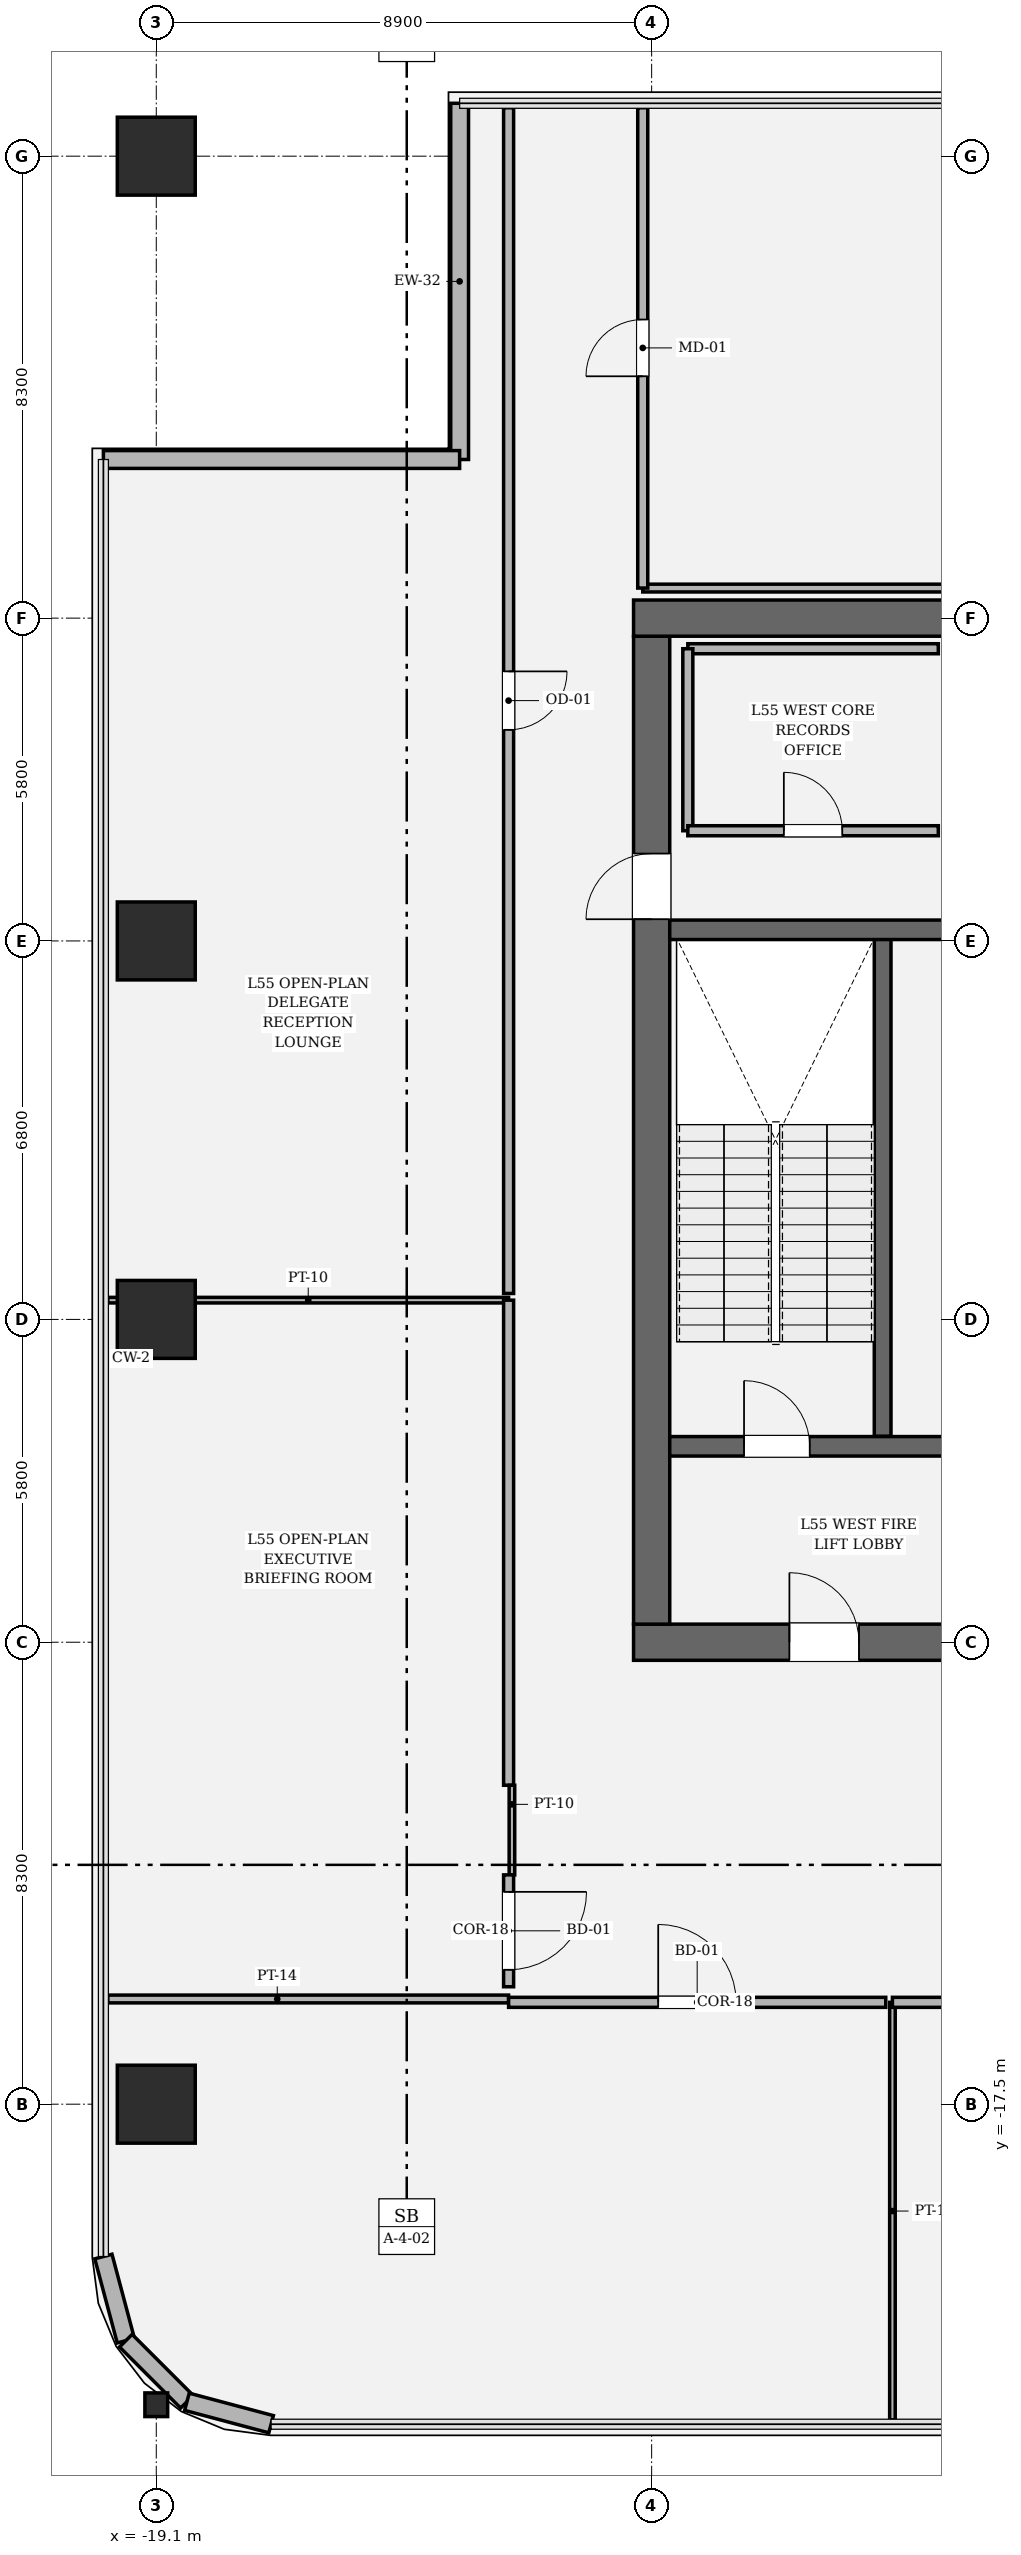
"""IFC4 building model, lengths in metres.
Left out: names, types, materials, properties, quantities, classifications, styles, units other than length and angle.
Written with IfcOpenShell. Run it as: python <this file> out.ifc"""

import sys

from ifc_helpers import new_model, si_unit, direction, frame, frame_2d, origin, origin_2d, place, context, subcontext, project, spatial, rectangle, hollow_rectangle, i_section, extrude, element, fill, save


model = new_model("IFC4")
c1 = context("Model", 3, precision=1e-05, world=origin(), true_north=direction((0.0, 1.0)))
c2 = subcontext(c1, "Body", "Model", "MODEL_VIEW")
j1 = project(units=[si_unit("LENGTHUNIT", "METRE"), si_unit("PLANEANGLEUNIT", "RADIAN")], contexts=[c1])
p1 = place(None, origin())
s1 = spatial("IfcSite", under=j1, at=p1, CompositionType="ELEMENT")
p2 = place(p1, origin())
s2 = spatial("IfcBuilding", under=s1, at=p2, CompositionType="ELEMENT")
p3 = place(p2, frame((0.0, 0.0, 232.95)))
s3 = spatial("IfcBuildingStorey", under=s2, at=p3, CompositionType="ELEMENT", Elevation=232.95)
p4 = place(p3, frame((10.525, -9.2, 0.0), z_axis=(0.0, 0.0, 1.0), x_axis=(-1.0, 0.0, 0.0)))
e1 = element("IfcWall", 1, at=p4, inside=s3, PredefinedType="SHEAR", context=c2, shape_type="SweptSolid", body=[
    extrude(rectangle(XDim=21.05, YDim=0.65, at=frame_2d((10.525, 0.0))), origin(), (0.0, 0.0, 1.0), 4.05),
])
p5 = place(p4, frame((2.8, 0.0, 0.0)))
e2 = element("IfcOpeningElement", 2, at=p5, cuts=e1, PredefinedType="OPENING", context=c2, shape_type="SweptSolid", body=[
    extrude(rectangle(XDim=1.25, YDim=2.25, at=frame_2d((0.625, 1.125))), frame((0.0, 0.335, 0.0), z_axis=(0.0, -1.0, 0.0), x_axis=(1.0, 0.0, 0.0)), (0.0, 0.0, 1.0), 0.67),
])
p6 = place(p4, frame((17.0, 0.0, 0.0)))
e3 = element("IfcOpeningElement", 3, at=p6, cuts=e1, PredefinedType="OPENING", context=c2, shape_type="SweptSolid", body=[
    extrude(rectangle(XDim=1.25, YDim=2.25, at=frame_2d((0.625, 1.125))), frame((0.0, 0.335, 0.0), z_axis=(0.0, -1.0, 0.0), x_axis=(1.0, 0.0, 0.0)), (0.0, 0.0, 1.0), 0.67),
])
p7 = place(p3, frame((-10.2, -8.875, 0.0), z_axis=(0.0, 0.0, 1.0), x_axis=(0.0, 1.0, 0.0)))
e4 = element("IfcWall", 4, at=p7, inside=s3, PredefinedType="SHEAR", context=c2, shape_type="SweptSolid", body=[
    extrude(rectangle(XDim=17.75, YDim=0.65, at=frame_2d((8.875, 0.0))), origin(), (0.0, 0.0, 1.0), 4.05),
])
p8 = place(p7, frame((12.665, 0.0, 0.0)))
e5 = element("IfcOpeningElement", 5, at=p8, cuts=e4, PredefinedType="OPENING", context=c2, shape_type="SweptSolid", body=[
    extrude(rectangle(XDim=1.18, YDim=2.2, at=frame_2d((0.59, 1.1))), frame((0.0, 0.335, 0.0), z_axis=(0.0, -1.0, 0.0), x_axis=(1.0, 0.0, 0.0)), (0.0, 0.0, 1.0), 0.67),
])
p9 = place(p3, frame((-10.525, 9.2, 0.0), z_axis=(0.0, 0.0, 1.0), x_axis=(1.0, 0.0, 0.0)))
e6 = element("IfcWall", 6, at=p9, inside=s3, PredefinedType="SHEAR", context=c2, shape_type="SweptSolid", body=[
    extrude(rectangle(XDim=21.05, YDim=0.65, at=frame_2d((10.525, 0.0))), origin(), (0.0, 0.0, 1.0), 4.05),
])
p10 = place(p3, frame((-6.05, -5.5, 0.0), z_axis=(0.0, 0.0, 1.0), x_axis=(0.0, 1.0, 0.0)))
e7 = element("IfcWall", 7, at=p10, inside=s3, PredefinedType="SOLIDWALL", context=c2, shape_type="SweptSolid", body=[
    extrude(rectangle(XDim=8.95, YDim=0.3, at=frame_2d((4.475, 0.0))), origin(), (0.0, 0.0, 1.0), 4.05),
])
p11 = place(p3, frame((-9.875, -5.68, 0.0), z_axis=(0.0, 0.0, 1.0), x_axis=(1.0, 0.0, 0.0)))
e8 = element("IfcWall", 8, at=p11, inside=s3, PredefinedType="SOLIDWALL", context=c2, shape_type="SweptSolid", body=[
    extrude(rectangle(XDim=5.225, YDim=0.35, at=frame_2d((2.613, 0.0))), origin(), (0.0, 0.0, 1.0), 4.05),
])
p12 = place(p11, frame((1.335, 0.0, 0.0)))
e9 = element("IfcOpeningElement", 9, at=p12, cuts=e8, PredefinedType="OPENING", context=c2, shape_type="SweptSolid", body=[
    extrude(rectangle(XDim=1.18, YDim=2.2, at=frame_2d((0.59, 1.1))), frame((0.0, 0.185, 0.0), z_axis=(0.0, -1.0, 0.0), x_axis=(1.0, 0.0, 0.0)), (0.0, 0.0, 1.0), 0.37),
])
p13 = place(p3, frame((-9.875, 3.6, 0.0), z_axis=(0.0, 0.0, 1.0), x_axis=(1.0, 0.0, 0.0)))
e10 = element("IfcWall", 10, at=p13, inside=s3, PredefinedType="SOLIDWALL", context=c2, shape_type="SweptSolid", body=[
    extrude(rectangle(XDim=5.225, YDim=0.35, at=frame_2d((2.613, 0.0))), origin(), (0.0, 0.0, 1.0), 4.05),
])
for number, where, z_axis, x_axis in (
    (11, (-19.1, -17.5, 0.0), (0.0, 0.0, 1.0), (1.0, 0.0, 0.0)),
    (12, (-19.1, 17.5, 0.0), (0.0, 0.0, 1.0), (1.0, 0.0, 0.0)),
    (13, (-19.1, 3.4, 0.0), (0.0, 0.0, 1.0), (1.0, 0.0, 0.0)),
    (14, (-19.1, -3.4, 0.0), (0.0, 0.0, 1.0), (1.0, 0.0, 0.0)),
):
    element("IfcColumn", number, at=place(p3, frame(where, z_axis=z_axis, x_axis=x_axis)), inside=s3, PredefinedType="COLUMN", context=c2, shape_type="SweptSolid", body=[
        extrude(hollow_rectangle(XDim=1.4, YDim=1.4, WallThickness=0.042, at=origin_2d()), origin(), (0.0, 0.0, 1.0), 4.05),
    ])
p14 = place(p3, frame((-19.1, -22.9, 0.0), z_axis=(0.0, 0.0, 1.0), x_axis=(1.0, 0.0, 0.0)))
e15 = element("IfcColumn", 15, at=p14, inside=s3, PredefinedType="COLUMN", context=c2, shape_type="SweptSolid", body=[
    extrude(i_section(OverallWidth=0.409, OverallDepth=0.425, WebThickness=0.032, FlangeThickness=0.052, FilletRadius=0.018, at=origin_2d()), origin(), (0.0, 0.0, 1.0), 4.048),
])
p15 = place(p3, frame((-13.65, 18.45, 0.0), z_axis=(0.0, 0.0, 1.0), x_axis=(0.0, -1.0, 0.0)))
e16 = element("IfcWall", 16, at=p15, inside=s3, PredefinedType="SOLIDWALL", context=c2, shape_type="SweptSolid", body=[
    extrude(rectangle(XDim=6.4, YDim=0.32, at=frame_2d((3.2, 0.0))), origin(), (0.0, 0.0, 1.0), 2.404),
])
p16 = place(p3, frame((-13.65, 12.05, 0.0), z_axis=(0.0, 0.0, 1.0), x_axis=(-1.0, 0.0, 0.0)))
e17 = element("IfcWall", 17, at=p16, inside=s3, PredefinedType="SOLIDWALL", context=c2, shape_type="SweptSolid", body=[
    extrude(rectangle(XDim=6.4, YDim=0.32, at=frame_2d((3.2, 0.0))), origin(), (0.0, 0.0, 1.0), 2.404),
])
p17 = place(p3, frame((-20.05, -20.237, 0.0), z_axis=(0.0, 0.0, 1.0), x_axis=(0.257847112249, -0.966185730957, 0.0)))
e18 = element("IfcWall", 18, at=p17, inside=s3, PredefinedType="SOLIDWALL", context=c2, shape_type="SweptSolid", body=[
    extrude(rectangle(XDim=1.565, YDim=0.32, at=frame_2d((0.783, 0.0))), origin(), (0.0, 0.0, 1.0), 3.73),
])
p18 = place(p3, frame((-19.646, -21.749, 0.0), z_axis=(0.0, 0.0, 1.0), x_axis=(0.707028130747, -0.707185422879, 0.0)))
e19 = element("IfcWall", 19, at=p18, inside=s3, PredefinedType="SOLIDWALL", context=c2, shape_type="SweptSolid", body=[
    extrude(rectangle(XDim=1.552, YDim=0.32, at=frame_2d((0.776, 0.0))), origin(), (0.0, 0.0, 1.0), 3.73),
])
p19 = place(p3, frame((-18.549, -22.847, 0.0), z_axis=(0.0, 0.0, 1.0), x_axis=(0.966224582397, -0.257701486942, 0.0)))
e20 = element("IfcWall", 20, at=p19, inside=s3, PredefinedType="SOLIDWALL", context=c2, shape_type="SweptSolid", body=[
    extrude(rectangle(XDim=1.565, YDim=0.32, at=frame_2d((0.783, 0.0))), origin(), (0.0, 0.0, 1.0), 3.73),
])
p20 = place(p3, frame((-5.05, 8.65, 0.0), z_axis=(0.0, 0.0, 1.0), x_axis=(-1.0, 0.0, 0.0)))
e21 = element("IfcWall", 21, at=p20, inside=s3, PredefinedType="PARTITIONING", context=c2, shape_type="SweptSolid", body=[
    extrude(rectangle(XDim=4.5, YDim=0.18, at=frame_2d((2.25, 0.0))), origin(), (0.0, 0.0, 1.0), 3.73),
])
p21 = place(p3, frame((-9.55, 8.65, 0.0), z_axis=(0.0, 0.0, 1.0), x_axis=(0.0, -1.0, 0.0)))
e22 = element("IfcWall", 22, at=p21, inside=s3, PredefinedType="PARTITIONING", context=c2, shape_type="SweptSolid", body=[
    extrude(rectangle(XDim=3.27, YDim=0.18, at=frame_2d((1.635, 0.0))), origin(), (0.0, 0.0, 1.0), 3.73),
])
p22 = place(p3, frame((-9.55, 5.38, 0.0), z_axis=(0.0, 0.0, 1.0), x_axis=(1.0, 0.0, 0.0)))
e23 = element("IfcWall", 23, at=p22, inside=s3, PredefinedType="PARTITIONING", context=c2, shape_type="SweptSolid", body=[
    extrude(rectangle(XDim=4.5, YDim=0.18, at=frame_2d((2.25, 0.0))), origin(), (0.0, 0.0, 1.0), 3.73),
])
p23 = place(p22, frame((1.725, 0.0, 0.0)))
e24 = element("IfcOpeningElement", 24, at=p23, cuts=e23, PredefinedType="OPENING", context=c2, shape_type="SweptSolid", body=[
    extrude(rectangle(XDim=1.05, YDim=2.2, at=frame_2d((0.525, 1.1))), frame((0.0, 0.1, 0.0), z_axis=(0.0, -1.0, 0.0), x_axis=(1.0, 0.0, 0.0)), (0.0, 0.0, 1.0), 0.2),
])
p24 = place(p3, frame((-5.874, -23.17, 0.0), z_axis=(0.0, 0.0, 1.0), x_axis=(0.0, 1.0, 0.0)))
e25 = element("IfcWall", 25, at=p24, inside=s3, PredefinedType="PARTITIONING", context=c2, shape_type="SweptSolid", body=[
    extrude(rectangle(XDim=7.5, YDim=0.1, at=frame_2d((3.75, 0.0))), origin(), (0.0, 0.0, 1.0), 2.404),
])
p25 = place(p3, frame((-5.874, -15.67, 0.0), z_axis=(0.0, 0.0, 1.0), x_axis=(1.0, 0.0, 0.0)))
e26 = element("IfcWall", 26, at=p25, inside=s3, PredefinedType="PARTITIONING", context=c2, shape_type="SweptSolid", body=[
    extrude(rectangle(XDim=4.674, YDim=0.18, at=frame_2d((2.337, 0.0))), origin(), (0.0, 0.0, 1.0), 2.404),
])
p26 = place(p3, frame((-19.97, -15.61, 0.0), z_axis=(0.0, 0.0, 1.0), x_axis=(1.0, 0.0, 0.0)))
e27 = element("IfcWall", 27, at=p26, inside=s3, PredefinedType="PARTITIONING", context=c2, shape_type="SweptSolid", body=[
    extrude(rectangle(XDim=7.2, YDim=0.14, at=frame_2d((3.6, 0.0))), origin(), (0.0, 0.0, 1.0), 2.404),
])
p27 = place(p3, frame((-12.77, -15.67, 0.0), z_axis=(0.0, 0.0, 1.0), x_axis=(1.0, 0.0, 0.0)))
e28 = element("IfcWall", 28, at=p27, inside=s3, PredefinedType="PARTITIONING", context=c2, shape_type="SweptSolid", body=[
    extrude(rectangle(XDim=6.776, YDim=0.18, at=frame_2d((3.388, 0.0))), origin(), (0.0, 0.0, 1.0), 3.73),
])
p28 = place(p27, frame((2.688, 0.0, 0.0)))
e29 = element("IfcOpeningElement", 29, at=p28, cuts=e28, PredefinedType="OPENING", context=c2, shape_type="SweptSolid", body=[
    extrude(rectangle(XDim=1.4, YDim=2.25, at=frame_2d((0.7, 1.125))), frame((0.0, 0.1, 0.0), z_axis=(0.0, -1.0, 0.0), x_axis=(1.0, 0.0, 0.0)), (0.0, 0.0, 1.0), 0.2),
])
p29 = place(p3, frame((-19.97, -3.054, 0.0), z_axis=(0.0, 0.0, 1.0), x_axis=(1.0, 0.0, 0.0)))
e30 = element("IfcWall", 30, at=p29, inside=s3, PredefinedType="PARTITIONING", context=c2, shape_type="SweptSolid", body=[
    extrude(rectangle(XDim=7.2, YDim=0.1, at=frame_2d((3.6, 0.0))), origin(), (0.0, 0.0, 1.0), 2.404),
])
p30 = place(p3, frame((-12.77, -3.054, 0.0), z_axis=(0.0, 0.0, 1.0), x_axis=(0.0, -1.0, 0.0)))
e31 = element("IfcWall", 31, at=p30, inside=s3, PredefinedType="PARTITIONING", context=c2, shape_type="SweptSolid", body=[
    extrude(rectangle(XDim=8.716, YDim=0.18, at=frame_2d((4.358, 0.0))), origin(), (0.0, 0.0, 1.0), 2.404),
])
p31 = place(p3, frame((-12.71, -11.77, 0.0), z_axis=(0.0, 0.0, 1.0), x_axis=(0.0, -1.0, 0.0)))
e32 = element("IfcWall", 32, at=p31, inside=s3, PredefinedType="PARTITIONING", context=c2, shape_type="SweptSolid", body=[
    extrude(rectangle(XDim=1.61, YDim=0.1, at=frame_2d((0.805, 0.0))), origin(), (0.0, 0.0, 1.0), 2.444),
])
p32 = place(p3, frame((-12.77, -13.38, 0.0), z_axis=(0.0, 0.0, 1.0), x_axis=(0.0, -1.0, 0.0)))
e33 = element("IfcWall", 33, at=p32, inside=s3, PredefinedType="PARTITIONING", context=c2, shape_type="SweptSolid", body=[
    extrude(rectangle(XDim=2.01, YDim=0.18, at=frame_2d((1.005, 0.0))), origin(), (0.0, 0.0, 1.0), 2.444),
])
p33 = place(p32, frame((0.305, 0.0, 0.0)))
e34 = element("IfcOpeningElement", 34, at=p33, cuts=e33, PredefinedType="OPENING", context=c2, shape_type="SweptSolid", body=[
    extrude(rectangle(XDim=1.4, YDim=2.25, at=frame_2d((0.7, 1.125))), frame((0.0, 0.1, 0.0), z_axis=(0.0, -1.0, 0.0), x_axis=(1.0, 0.0, 0.0)), (0.0, 0.0, 1.0), 0.2),
])
p34 = place(p3, frame((-12.77, 18.37, 0.0), z_axis=(0.0, 0.0, 1.0), x_axis=(0.0, -1.0, 0.0)))
e35 = element("IfcWall", 35, at=p34, inside=s3, PredefinedType="PARTITIONING", context=c2, shape_type="SweptSolid", body=[
    extrude(rectangle(XDim=21.304, YDim=0.18, at=frame_2d((10.652, 0.0))), origin(), (0.0, 0.0, 1.0), 2.404),
])
p35 = place(p34, frame((10.127, 0.0, 0.0)))
e36 = element("IfcOpeningElement", 36, at=p35, cuts=e35, PredefinedType="OPENING", context=c2, shape_type="SweptSolid", body=[
    extrude(rectangle(XDim=1.05, YDim=2.2, at=frame_2d((0.525, 1.1))), frame((0.0, 0.1, 0.0), z_axis=(0.0, -1.0, 0.0), x_axis=(1.0, 0.0, 0.0)), (0.0, 0.0, 1.0), 0.2),
])
p36 = place(p3, frame((2.874, 9.74, 0.0), z_axis=(0.0, 0.0, 1.0), x_axis=(-1.0, 0.0, 0.0)))
e37 = element("IfcWall", 37, at=p36, inside=s3, PredefinedType="PARTITIONING", context=c2, shape_type="SweptSolid", body=[
    extrude(rectangle(XDim=13.234, YDim=0.14, at=frame_2d((6.617, 0.0))), origin(), (0.0, 0.0, 1.0), 2.404),
])
p37 = place(p3, frame((-10.36, 9.74, 0.0), z_axis=(0.0, 0.0, 1.0), x_axis=(0.0, 1.0, 0.0)))
e38 = element("IfcWall", 38, at=p37, inside=s3, PredefinedType="PARTITIONING", context=c2, shape_type="SweptSolid", body=[
    extrude(rectangle(XDim=8.63, YDim=0.18, at=frame_2d((4.315, 0.0))), origin(), (0.0, 0.0, 1.0), 2.404),
])
p38 = place(p37, frame((3.805, 0.0, 0.0)))
e39 = element("IfcOpeningElement", 39, at=p38, cuts=e38, PredefinedType="OPENING", context=c2, shape_type="SweptSolid", body=[
    extrude(rectangle(XDim=1.02, YDim=2.2, at=frame_2d((0.51, 1.1))), frame((0.0, 0.1, 0.0), z_axis=(0.0, -1.0, 0.0), x_axis=(1.0, 0.0, 0.0)), (0.0, 0.0, 1.0), 0.2),
])
p39 = place(p12, origin())
e40 = element("IfcDoor", 40, at=p39, inside=s3, OperationType="SINGLE_SWING_LEFT", PredefinedType="DOOR", context=c2, shape_type="SweptSolid", body=[
    extrude(rectangle(XDim=1.18, YDim=2.2, at=frame_2d((0.59, 1.1))), frame((0.0, 0.025, 0.0), z_axis=(0.0, -1.0, 0.0), x_axis=(1.0, 0.0, 0.0)), (0.0, 0.0, 1.0), 0.05),
])
fill(e9, e40)
p40 = place(p6, origin())
e41 = element("IfcDoor", 41, at=p40, inside=s3, OperationType="SINGLE_SWING_RIGHT", PredefinedType="DOOR", context=c2, shape_type="SweptSolid", body=[
    extrude(rectangle(XDim=1.25, YDim=2.25, at=frame_2d((0.625, 1.125))), frame((0.0, 0.025, 0.0), z_axis=(0.0, -1.0, 0.0), x_axis=(1.0, 0.0, 0.0)), (0.0, 0.0, 1.0), 0.05),
])
fill(e3, e41)
p41 = place(p8, origin())
e42 = element("IfcDoor", 42, at=p41, inside=s3, OperationType="SINGLE_SWING_LEFT", PredefinedType="DOOR", context=c2, shape_type="SweptSolid", body=[
    extrude(rectangle(XDim=1.18, YDim=2.2, at=frame_2d((0.59, 1.1))), frame((0.0, 0.025, 0.0), z_axis=(0.0, -1.0, 0.0), x_axis=(1.0, 0.0, 0.0)), (0.0, 0.0, 1.0), 0.05),
])
fill(e5, e42)
p42 = place(p23, origin())
e43 = element("IfcDoor", 43, at=p42, inside=s3, OperationType="SINGLE_SWING_LEFT", PredefinedType="DOOR", context=c2, shape_type="SweptSolid", body=[
    extrude(rectangle(XDim=1.05, YDim=2.2, at=frame_2d((0.525, 1.1))), frame((0.0, 0.025, 0.0), z_axis=(0.0, -1.0, 0.0), x_axis=(1.0, 0.0, 0.0)), (0.0, 0.0, 1.0), 0.05),
])
fill(e24, e43)
p43 = place(p28, origin())
e44 = element("IfcDoor", 44, at=p43, inside=s3, OperationType="SINGLE_SWING_LEFT", PredefinedType="DOOR", context=c2, shape_type="SweptSolid", body=[
    extrude(rectangle(XDim=1.4, YDim=2.25, at=frame_2d((0.7, 1.125))), frame((0.0, 0.025, 0.0), z_axis=(0.0, -1.0, 0.0), x_axis=(1.0, 0.0, 0.0)), (0.0, 0.0, 1.0), 0.05),
])
fill(e29, e44)
p44 = place(p33, origin())
e45 = element("IfcDoor", 45, at=p44, inside=s3, OperationType="SINGLE_SWING_LEFT", PredefinedType="DOOR", context=c2, shape_type="SweptSolid", body=[
    extrude(rectangle(XDim=1.4, YDim=2.25, at=frame_2d((0.7, 1.125))), frame((0.0, 0.025, 0.0), z_axis=(0.0, -1.0, 0.0), x_axis=(1.0, 0.0, 0.0)), (0.0, 0.0, 1.0), 0.05),
])
fill(e34, e45)
p45 = place(p35, origin())
e46 = element("IfcDoor", 46, at=p45, inside=s3, OperationType="SINGLE_SWING_LEFT", PredefinedType="DOOR", context=c2, shape_type="SweptSolid", body=[
    extrude(rectangle(XDim=1.05, YDim=2.2, at=frame_2d((0.525, 1.1))), frame((0.0, 0.025, 0.0), z_axis=(0.0, -1.0, 0.0), x_axis=(1.0, 0.0, 0.0)), (0.0, 0.0, 1.0), 0.05),
])
fill(e36, e46)
p46 = place(p38, origin())
e47 = element("IfcDoor", 47, at=p46, inside=s3, OperationType="SINGLE_SWING_LEFT", PredefinedType="DOOR", context=c2, shape_type="SweptSolid", body=[
    extrude(rectangle(XDim=1.02, YDim=2.2, at=frame_2d((0.51, 1.1))), frame((0.0, 0.025, 0.0), z_axis=(0.0, -1.0, 0.0), x_axis=(1.0, 0.0, 0.0)), (0.0, 0.0, 1.0), 0.05),
])
fill(e39, e47)
save(model, sys.argv[1])
